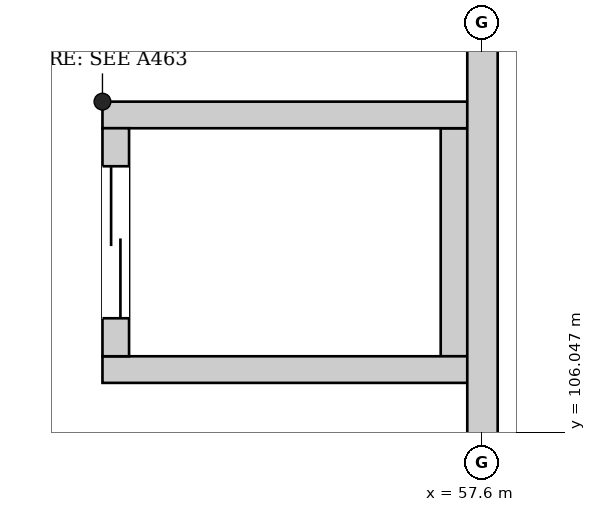
"""IFC4 building model, lengths in metres.
Left out: names, types, materials, properties, quantities, classifications, styles, units other than length and angle.
Written with IfcOpenShell. Run it as: python <this file> out.ifc"""

import sys

from ifc_helpers import new_model, si_unit, direction, frame, frame_2d, origin, place, context, subcontext, project, spatial, rectangle, extrude, element, fill, save


model = new_model("IFC4")
c1 = context("Model", 3, precision=1e-05, world=origin(), true_north=direction((0.0, 1.0)))
c2 = subcontext(c1, "Body", "Model", "MODEL_VIEW")
j1 = project(units=[si_unit("LENGTHUNIT", "METRE"), si_unit("PLANEANGLEUNIT", "RADIAN")], contexts=[c1])
p1 = place(None, origin())
s1 = spatial("IfcSite", under=j1, at=p1, CompositionType="ELEMENT")
p2 = place(p1, origin())
s2 = spatial("IfcBuilding", under=s1, at=p2, CompositionType="ELEMENT")
p3 = place(p2, frame((0.0, 0.0, 26.7)))
s3 = spatial("IfcBuildingStorey", under=s2, at=p3, CompositionType="ELEMENT", Elevation=26.7)
p4 = place(p3, frame((57.6, 94.12, 0.0), z_axis=(0.0, 0.0, 1.0), x_axis=(0.0, 1.0, 0.0)))
e1 = element("IfcWall", 1, at=p4, inside=s3, PredefinedType="SHEAR", context=c2, shape_type="SweptSolid", body=[
    extrude(rectangle(XDim=46.88, YDim=0.4, at=frame_2d((23.44, 0.0))), origin(), (0.0, 0.0, 1.0), 5.2),
])
for number, where, z_axis, x_axis in (
    (2, (52.6, 106.875, 0.0), (0.0, 0.0, 1.0), (1.0, 0.0, 0.0)),
    (3, (52.6, 110.225, 0.0), (0.0, 0.0, 1.0), (1.0, 0.0, 0.0)),
):
    element("IfcWall", number, at=place(p3, frame(where, z_axis=z_axis, x_axis=x_axis)), inside=s3, PredefinedType="SHEAR", context=c2, shape_type="SweptSolid", body=[
        extrude(rectangle(XDim=4.8, YDim=0.35, at=frame_2d((2.4, 0.0))), origin(), (0.0, 0.0, 1.0), 4.85),
    ])
p5 = place(p3, frame((52.775, 107.05, 0.0), z_axis=(0.0, 0.0, 1.0), x_axis=(0.0, 1.0, 0.0)))
e4 = element("IfcWall", 4, at=p5, inside=s3, PredefinedType="SHEAR", context=c2, shape_type="SweptSolid", body=[
    extrude(rectangle(XDim=3.0, YDim=0.35, at=frame_2d((1.5, 0.0))), origin(), (0.0, 0.0, 1.0), 4.85),
])
p6 = place(p5, frame((0.5, 0.0, 0.0)))
e5 = element("IfcOpeningElement", 5, at=p6, cuts=e4, PredefinedType="OPENING", context=c2, shape_type="SweptSolid", body=[
    extrude(rectangle(XDim=2.0, YDim=2.4, at=frame_2d((1.0, 1.2))), frame((0.0, 0.185, 0.0), z_axis=(0.0, -1.0, 0.0), x_axis=(1.0, 0.0, 0.0)), (0.0, 0.0, 1.0), 0.37),
])
p7 = place(p3, frame((57.225, 107.05, 0.0), z_axis=(0.0, 0.0, 1.0), x_axis=(0.0, 1.0, 0.0)))
e6 = element("IfcWall", 6, at=p7, inside=s3, PredefinedType="SHEAR", context=c2, shape_type="SweptSolid", body=[
    extrude(rectangle(XDim=3.0, YDim=0.35, at=frame_2d((1.5, 0.0))), origin(), (0.0, 0.0, 1.0), 4.85),
])
p8 = place(p6, origin())
e7 = element("IfcDoor", 7, at=p8, inside=s3, OperationType="DOUBLE_DOOR_SLIDING", PredefinedType="DOOR", context=c2, shape_type="SweptSolid", body=[
    extrude(rectangle(XDim=2.0, YDim=2.4, at=frame_2d((1.0, 1.2))), frame((0.0, 0.025, 0.0), z_axis=(0.0, -1.0, 0.0), x_axis=(1.0, 0.0, 0.0)), (0.0, 0.0, 1.0), 0.05),
])
fill(e5, e7)
save(model, sys.argv[1])
